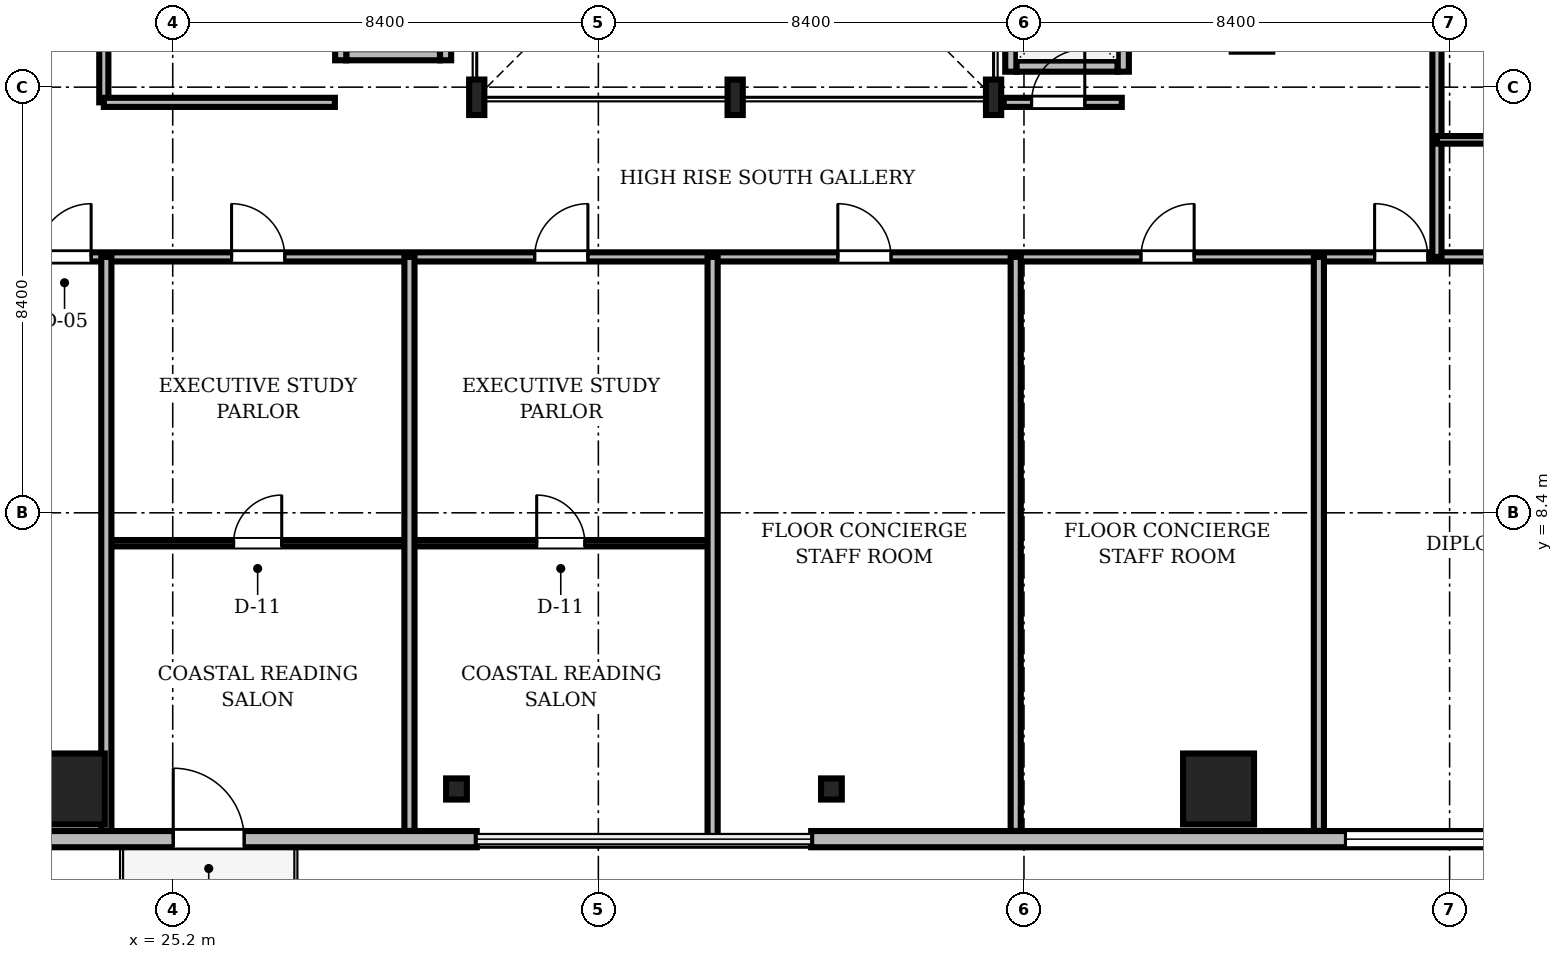
"""IFC4 building model, lengths in metres.
Left out: names, types, materials, properties, quantities, classifications, styles, units other than length and angle.
Written with IfcOpenShell. Run it as: python <this file> out.ifc"""

import sys

from ifc_helpers import new_model, si_unit, direction, frame, frame_2d, origin, origin_2d, place, context, subcontext, project, spatial, rectangle, i_section, extrude, source, transform, mapped, element, fill, save


model = new_model("IFC4")
c1 = context("Model", 3, precision=1e-05, world=origin(), true_north=direction((0.0, 1.0)))
c2 = subcontext(c1, "Body", "Model", "MODEL_VIEW")
j1 = project(units=[si_unit("LENGTHUNIT", "METRE"), si_unit("PLANEANGLEUNIT", "RADIAN")], contexts=[c1])
p1 = place(None, origin())
s1 = spatial("IfcSite", under=j1, at=p1, CompositionType="ELEMENT")
p2 = place(p1, origin())
s2 = spatial("IfcBuilding", under=s1, at=p2, CompositionType="ELEMENT")
p3 = place(p2, frame((0.0, 0.0, 203.55)))
s3 = spatial("IfcBuildingStorey", under=s2, at=p3, CompositionType="ELEMENT", Elevation=203.55)
m1 = source(origin(), c2, "Body", "SweptSolid", [
    extrude(i_section(OverallWidth=0.3, OverallDepth=0.7, WebThickness=0.017, FlangeThickness=0.032, FilletRadius=0.027, at=origin_2d()), origin(), (0.0, 0.0, 1.0), 3.53),
])
for number, where, z_axis, x_axis in (
    (1, (31.2, 16.6, 0.0), (0.0, 0.0, 1.0), (1.0, 0.0, 0.0)),
    (2, (36.3, 16.6, 0.0), (0.0, 0.0, 1.0), (1.0, 0.0, 0.0)),
    (3, (41.4, 16.6, 0.0), (0.0, 0.0, 1.0), (1.0, 0.0, 0.0)),
):
    element("IfcColumn", number, at=place(p3, frame(where, z_axis=z_axis, x_axis=x_axis)), inside=s3, PredefinedType="COLUMN", context=c2, shape_type="MappedRepresentation", body=[
        mapped(m1, transform((0.0, 0.0, 0.0), scale=1.0)),
    ])
m2 = source(origin(), c2, "Body", "SweptSolid", [
    extrude(rectangle(XDim=1.4, YDim=1.4, at=origin_2d()), origin(), (0.0, 0.0, 1.0), 3.53),
])
for number, where, z_axis, x_axis in (
    (4, (23.16, 2.95, 0.0), (0.0, 0.0, 1.0), (1.0, 0.0, 0.0)),
    (5, (45.84, 2.95, 0.0), (0.0, 0.0, 1.0), (1.0, 0.0, 0.0)),
):
    element("IfcColumn", number, at=place(p3, frame(where, z_axis=z_axis, x_axis=x_axis)), inside=s3, PredefinedType="COLUMN", context=c2, shape_type="MappedRepresentation", body=[
        mapped(m2, transform((0.0, 0.0, 0.0), scale=1.0)),
    ])
m3 = source(origin(), c2, "Body", "SweptSolid", [
    extrude(i_section(OverallWidth=0.409, OverallDepth=0.417, WebThickness=0.021, FlangeThickness=0.033, FilletRadius=0.015, at=origin_2d()), origin(), (0.0, 0.0, 1.0), 3.53),
])
for number, where, z_axis, x_axis in (
    (6, (30.8, 2.95, 0.0), (0.0, 0.0, 1.0), (1.0, 0.0, 0.0)),
    (7, (38.2, 2.95, 0.0), (0.0, 0.0, 1.0), (1.0, 0.0, 0.0)),
):
    element("IfcColumn", number, at=place(p3, frame(where, z_axis=z_axis, x_axis=x_axis)), inside=s3, PredefinedType="COLUMN", context=c2, shape_type="MappedRepresentation", body=[
        mapped(m3, transform((0.0, 0.0, 0.0), scale=1.0)),
    ])
m4 = source(origin(), c2, "Body", "SweptSolid", [
    extrude(rectangle(XDim=15.6, YDim=0.32, at=frame_2d((7.8, 0.0))), origin(), (0.0, 0.0, 1.0), 3.53),
])
p4 = place(p3, frame((15.6, 1.96, 0.0), z_axis=(0.0, 0.0, 1.0), x_axis=(1.0, 0.0, 0.0)))
e8 = element("IfcWall", 8, at=p4, inside=s3, PredefinedType="SOLIDWALL", context=c2, shape_type="MappedRepresentation", body=[
    mapped(m4, transform((0.0, 0.0, 0.0), scale=1.0)),
])
m5 = source(origin(), c2, "Body", "SweptSolid", [
    extrude(rectangle(XDim=1.4, YDim=2.3, at=frame_2d((0.7, 1.15))), frame((0.0, 0.17, 0.0), z_axis=(0.0, -1.0, 0.0), x_axis=(1.0, 0.0, 0.0)), (0.0, 0.0, 1.0), 0.34),
])
p5 = place(p4, frame((9.61, 0.0, 0.0)))
e9 = element("IfcOpeningElement", 9, at=p5, cuts=e8, PredefinedType="OPENING", context=c2, shape_type="MappedRepresentation", body=[
    mapped(m5, transform((0.0, 0.0, 0.0), scale=1.0)),
])
m6 = source(origin(), c2, "Body", "SweptSolid", [
    extrude(rectangle(XDim=2.8, YDim=2.4, at=frame_2d((1.4, 1.2))), frame((0.0, 0.17, 0.0), z_axis=(0.0, -1.0, 0.0), x_axis=(1.0, 0.0, 0.0)), (0.0, 0.0, 1.0), 0.34),
])
p6 = place(p4, frame((2.705, 0.0, 0.72)))
e10 = element("IfcOpeningElement", 10, at=p6, cuts=e8, PredefinedType="OPENING", context=c2, shape_type="MappedRepresentation", body=[
    mapped(m6, transform((0.0, 0.0, 0.0), scale=1.0)),
])
p7 = place(p3, frame((37.8, 1.96, 0.0), z_axis=(0.0, 0.0, 1.0), x_axis=(1.0, 0.0, 0.0)))
e11 = element("IfcWall", 11, at=p7, inside=s3, PredefinedType="SOLIDWALL", context=c2, shape_type="MappedRepresentation", body=[
    mapped(m4, transform((0.0, 0.0, 0.0), scale=1.0)),
])
p8 = place(p7, frame((10.545, 0.0, 0.72)))
e12 = element("IfcOpeningElement", 12, at=p8, cuts=e11, PredefinedType="OPENING", context=c2, shape_type="MappedRepresentation", body=[
    mapped(m6, transform((0.0, 0.0, 0.0), scale=1.0)),
])
m7 = source(origin(), c2, "Body", "SweptSolid", [
    extrude(rectangle(XDim=2.0, YDim=0.22, at=frame_2d((1.0, 0.0))), origin(), (0.0, 0.0, 1.0), 3.53),
])
p9 = place(p3, frame((41.85, 17.215, 0.0), z_axis=(0.0, 0.0, 1.0), x_axis=(1.0, 0.0, 0.0)))
e13 = element("IfcWall", 13, at=p9, inside=s3, PredefinedType="SOLIDWALL", context=c2, shape_type="MappedRepresentation", body=[
    mapped(m7, transform((0.0, 0.0, 0.0), scale=1.0)),
])
m8 = source(origin(), c2, "Body", "SweptSolid", [
    extrude(rectangle(XDim=2.19, YDim=0.22, at=frame_2d((1.095, 0.0))), origin(), (0.0, 0.0, 1.0), 3.53),
])
p10 = place(p3, frame((41.74, 17.105, 0.0), z_axis=(0.0, 0.0, 1.0), x_axis=(0.0, 1.0, 0.0)))
e14 = element("IfcWall", 14, at=p10, inside=s3, PredefinedType="SOLIDWALL", context=c2, shape_type="MappedRepresentation", body=[
    mapped(m8, transform((0.0, 0.0, 0.0), scale=1.0)),
])
p11 = place(p3, frame((43.96, 17.105, 0.0), z_axis=(0.0, 0.0, 1.0), x_axis=(0.0, 1.0, 0.0)))
e15 = element("IfcWall", 15, at=p11, inside=s3, PredefinedType="SOLIDWALL", context=c2, shape_type="MappedRepresentation", body=[
    mapped(m8, transform((0.0, 0.0, 0.0), scale=1.0)),
])
m9 = source(origin(), c2, "Body", "SweptSolid", [
    extrude(rectangle(XDim=1.1, YDim=2.2, at=frame_2d((0.55, 1.1))), frame((0.0, 0.12, 0.0), z_axis=(0.0, -1.0, 0.0), x_axis=(1.0, 0.0, 0.0)), (0.0, 0.0, 1.0), 0.24),
])
p12 = place(p11, frame((0.545, 0.0, 0.0)))
e16 = element("IfcOpeningElement", 16, at=p12, cuts=e15, PredefinedType="OPENING", context=c2, shape_type="MappedRepresentation", body=[
    mapped(m9, transform((0.0, 0.0, 0.0), scale=1.0)),
])
m10 = source(origin(), c2, "Body", "SweptSolid", [
    extrude(rectangle(XDim=1.85, YDim=0.22, at=frame_2d((0.925, 0.0))), origin(), (0.0, 0.0, 1.0), 2.972),
])
p13 = place(p3, frame((28.625, 17.44, 0.0), z_axis=(0.0, 0.0, 1.0), x_axis=(1.0, 0.0, 0.0)))
e17 = element("IfcWall", 17, at=p13, inside=s3, PredefinedType="SOLIDWALL", context=c2, shape_type="MappedRepresentation", body=[
    mapped(m10, transform((0.0, 0.0, 0.0), scale=1.0)),
])
m11 = source(origin(), c2, "Body", "SweptSolid", [
    extrude(rectangle(XDim=2.54, YDim=0.22, at=frame_2d((1.27, 0.0))), origin(), (0.0, 0.0, 1.0), 2.972),
])
p14 = place(p3, frame((28.515, 17.33, 0.0), z_axis=(0.0, 0.0, 1.0), x_axis=(0.0, 1.0, 0.0)))
e18 = element("IfcWall", 18, at=p14, inside=s3, PredefinedType="SOLIDWALL", context=c2, shape_type="MappedRepresentation", body=[
    mapped(m11, transform((0.0, 0.0, 0.0), scale=1.0)),
])
m12 = source(origin(), c2, "Body", "SweptSolid", [
    extrude(rectangle(XDim=2.54, YDim=0.22, at=frame_2d((1.27, 0.0))), origin(), (0.0, 0.0, 1.0), 3.53),
])
p15 = place(p3, frame((30.585, 17.33, 0.0), z_axis=(0.0, 0.0, 1.0), x_axis=(0.0, 1.0, 0.0)))
e19 = element("IfcWall", 19, at=p15, inside=s3, PredefinedType="SOLIDWALL", context=c2, shape_type="MappedRepresentation", body=[
    mapped(m12, transform((0.0, 0.0, 0.0), scale=1.0)),
])
m13 = source(origin(), c2, "Body", "SweptSolid", [
    extrude(rectangle(XDim=46.156, YDim=0.18, at=frame_2d((23.078, 0.0))), origin(), (0.0, 0.0, 1.0), 2.772),
])
p16 = place(p3, frame((11.422, 13.45, 0.0), z_axis=(0.0, 0.0, 1.0), x_axis=(1.0, 0.0, 0.0)))
e20 = element("IfcWall", 20, at=p16, inside=s3, PredefinedType="PARTITIONING", context=c2, shape_type="MappedRepresentation", body=[
    mapped(m13, transform((0.0, 0.0, 0.0), scale=1.0)),
])
m14 = source(origin(), c2, "Body", "SweptSolid", [
    extrude(rectangle(XDim=1.05, YDim=2.2, at=frame_2d((0.525, 1.1))), frame((0.0, 0.1, 0.0), z_axis=(0.0, -1.0, 0.0), x_axis=(1.0, 0.0, 0.0)), (0.0, 0.0, 1.0), 0.2),
])
p17 = place(p16, frame((11.118, 0.0, 0.0)))
e21 = element("IfcOpeningElement", 21, at=p17, cuts=e20, PredefinedType="OPENING", context=c2, shape_type="MappedRepresentation", body=[
    mapped(m14, transform((0.0, 0.0, 0.0), scale=1.0)),
])
p18 = place(p16, frame((14.939, 0.0, 0.0)))
e22 = element("IfcOpeningElement", 22, at=p18, cuts=e20, PredefinedType="OPENING", context=c2, shape_type="MappedRepresentation", body=[
    mapped(m14, transform((0.0, 0.0, 0.0), scale=1.0)),
])
p19 = place(p16, frame((20.922, 0.0, 0.0)))
e23 = element("IfcOpeningElement", 23, at=p19, cuts=e20, PredefinedType="OPENING", context=c2, shape_type="MappedRepresentation", body=[
    mapped(m14, transform((0.0, 0.0, 0.0), scale=1.0)),
])
p20 = place(p16, frame((26.904, 0.0, 0.0)))
e24 = element("IfcOpeningElement", 24, at=p20, cuts=e20, PredefinedType="OPENING", context=c2, shape_type="MappedRepresentation", body=[
    mapped(m14, transform((0.0, 0.0, 0.0), scale=1.0)),
])
p21 = place(p16, frame((32.887, 0.0, 0.0)))
e25 = element("IfcOpeningElement", 25, at=p21, cuts=e20, PredefinedType="OPENING", context=c2, shape_type="MappedRepresentation", body=[
    mapped(m14, transform((0.0, 0.0, 0.0), scale=1.0)),
])
p22 = place(p16, frame((37.498, 0.0, 0.0)))
e26 = element("IfcOpeningElement", 26, at=p22, cuts=e20, PredefinedType="OPENING", context=c2, shape_type="MappedRepresentation", body=[
    mapped(m14, transform((0.0, 0.0, 0.0), scale=1.0)),
])
m15 = source(origin(), c2, "Body", "SweptSolid", [
    extrude(rectangle(XDim=27.65, YDim=0.18, at=frame_2d((13.825, 0.0))), origin(), (0.0, 0.0, 1.0), 2.972),
])
p23 = place(p3, frame((50.15, 13.45, 0.0), z_axis=(0.0, 0.0, 1.0), x_axis=(0.0, 1.0, 0.0)))
e27 = element("IfcWall", 27, at=p23, inside=s3, PredefinedType="PARTITIONING", context=c2, shape_type="MappedRepresentation", body=[
    mapped(m15, transform((0.0, 0.0, 0.0), scale=1.0)),
])
p24 = place(p23, frame((5.237, 0.0, 0.0)))
e28 = element("IfcOpeningElement", 28, at=p24, cuts=e27, PredefinedType="OPENING", context=c2, shape_type="MappedRepresentation", body=[
    mapped(m14, transform((0.0, 0.0, 0.0), scale=1.0)),
])
p25 = place(p23, frame((14.38, 0.0, 0.0)))
e29 = element("IfcOpeningElement", 29, at=p25, cuts=e27, PredefinedType="OPENING", context=c2, shape_type="MappedRepresentation", body=[
    mapped(m14, transform((0.0, 0.0, 0.0), scale=1.0)),
])
p26 = place(p23, frame((23.523, 0.0, 0.0)))
e30 = element("IfcOpeningElement", 30, at=p26, cuts=e27, PredefinedType="OPENING", context=c2, shape_type="MappedRepresentation", body=[
    mapped(m14, transform((0.0, 0.0, 0.0), scale=1.0)),
])
m16 = source(origin(), c2, "Body", "SweptSolid", [
    extrude(rectangle(XDim=5.983, YDim=0.125, at=frame_2d((2.991, 0.0))), origin(), (0.0, 0.0, 1.0), 2.972),
])
p27 = place(p3, frame((29.872, 7.8, 0.0), z_axis=(0.0, 0.0, 1.0), x_axis=(1.0, 0.0, 0.0)))
e31 = element("IfcWall", 31, at=p27, inside=s3, PredefinedType="PARTITIONING", context=c2, shape_type="MappedRepresentation", body=[
    mapped(m16, transform((0.0, 0.0, 0.0), scale=1.0)),
])
m17 = source(origin(), c2, "Body", "SweptSolid", [
    extrude(rectangle(XDim=0.95, YDim=2.15, at=frame_2d((0.475, 1.075))), frame((0.0, 0.073, 0.0), z_axis=(0.0, -1.0, 0.0), x_axis=(1.0, 0.0, 0.0)), (0.0, 0.0, 1.0), 0.145),
])
p28 = place(p27, frame((2.511, 0.0, 0.0)))
e32 = element("IfcOpeningElement", 32, at=p28, cuts=e31, PredefinedType="OPENING", context=c2, shape_type="MappedRepresentation", body=[
    mapped(m17, transform((0.0, 0.0, 0.0), scale=1.0)),
])
m18 = source(origin(), c2, "Body", "SweptSolid", [
    extrude(rectangle(XDim=5.982, YDim=0.125, at=frame_2d((2.991, 0.0))), origin(), (0.0, 0.0, 1.0), 2.972),
])
p29 = place(p3, frame((23.89, 7.8, 0.0), z_axis=(0.0, 0.0, 1.0), x_axis=(1.0, 0.0, 0.0)))
e33 = element("IfcWall", 33, at=p29, inside=s3, PredefinedType="PARTITIONING", context=c2, shape_type="MappedRepresentation", body=[
    mapped(m18, transform((0.0, 0.0, 0.0), scale=1.0)),
])
p30 = place(p29, frame((2.511, 0.0, 0.0)))
e34 = element("IfcOpeningElement", 34, at=p30, cuts=e33, PredefinedType="OPENING", context=c2, shape_type="MappedRepresentation", body=[
    mapped(m17, transform((0.0, 0.0, 0.0), scale=1.0)),
])
m19 = source(origin(), c2, "Body", "SweptSolid", [
    extrude(rectangle(XDim=5.4, YDim=0.18, at=frame_2d((2.7, 0.0))), origin(), (0.0, 0.0, 1.0), 2.972),
])
p31 = place(p3, frame((23.84, 16.5, 0.0), z_axis=(0.0, 0.0, 1.0), x_axis=(0.0, 1.0, 0.0)))
e35 = element("IfcWall", 35, at=p31, inside=s3, PredefinedType="PARTITIONING", context=c2, shape_type="MappedRepresentation", body=[
    mapped(m19, transform((0.0, 0.0, 0.0), scale=1.0)),
])
p32 = place(p31, frame((2.0, 0.0, 0.0)))
e36 = element("IfcOpeningElement", 36, at=p32, cuts=e35, PredefinedType="OPENING", context=c2, shape_type="MappedRepresentation", body=[
    mapped(m14, transform((0.0, 0.0, 0.0), scale=1.0)),
])
m20 = source(origin(), c2, "Body", "SweptSolid", [
    extrude(rectangle(XDim=2.33, YDim=0.18, at=frame_2d((1.165, 0.0))), origin(), (0.0, 0.0, 1.0), 2.972),
])
p33 = place(p3, frame((41.6, 16.5, 0.0), z_axis=(0.0, 0.0, 1.0), x_axis=(1.0, 0.0, 0.0)))
e37 = element("IfcWall", 37, at=p33, inside=s3, PredefinedType="PARTITIONING", context=c2, shape_type="MappedRepresentation", body=[
    mapped(m20, transform((0.0, 0.0, 0.0), scale=1.0)),
])
p34 = place(p33, frame((0.55, 0.0, 0.0)))
e38 = element("IfcOpeningElement", 38, at=p34, cuts=e37, PredefinedType="OPENING", context=c2, shape_type="MappedRepresentation", body=[
    mapped(m14, transform((0.0, 0.0, 0.0), scale=1.0)),
])
m21 = source(origin(), c2, "Body", "SweptSolid", [
    extrude(rectangle(XDim=11.328, YDim=0.2, at=frame_2d((5.664, 0.0))), origin(), (0.0, 0.0, 1.0), 2.772),
])
for number, where, z_axis, x_axis in (
    (39, (23.89, 2.122, 0.0), (0.0, 0.0, 1.0), (0.0, 1.0, 0.0)),
    (40, (29.872, 2.122, 0.0), (0.0, 0.0, 1.0), (0.0, 1.0, 0.0)),
):
    element("IfcWall", number, at=place(p3, frame(where, z_axis=z_axis, x_axis=x_axis)), inside=s3, PredefinedType="PARTITIONING", context=c2, shape_type="MappedRepresentation", body=[
        mapped(m21, transform((0.0, 0.0, 0.0), scale=1.0)),
    ])
m22 = source(origin(), c2, "Body", "SweptSolid", [
    extrude(rectangle(XDim=11.52, YDim=0.2, at=frame_2d((5.76, 0.0))), origin(), (0.0, 0.0, 1.0), 2.772),
])
p35 = place(p3, frame((35.855, 1.93, 0.0), z_axis=(0.0, 0.0, 1.0), x_axis=(0.0, 1.0, 0.0)))
e41 = element("IfcWall", 41, at=p35, inside=s3, PredefinedType="PARTITIONING", context=c2, shape_type="MappedRepresentation", body=[
    mapped(m22, transform((0.0, 0.0, 0.0), scale=1.0)),
])
for number, where, z_axis, x_axis in (
    (42, (41.837, 2.122, 0.0), (0.0, 0.0, 1.0), (0.0, 1.0, 0.0)),
    (43, (47.82, 2.122, 0.0), (0.0, 0.0, 1.0), (0.0, 1.0, 0.0)),
):
    element("IfcWall", number, at=place(p3, frame(where, z_axis=z_axis, x_axis=x_axis)), inside=s3, PredefinedType="PARTITIONING", context=c2, shape_type="MappedRepresentation", body=[
        mapped(m21, transform((0.0, 0.0, 0.0), scale=1.0)),
    ])
m23 = source(origin(), c2, "Body", "SweptSolid", [
    extrude(rectangle(XDim=4.56, YDim=0.18, at=frame_2d((2.28, 0.0))), origin(), (0.0, 0.0, 1.0), 3.53),
])
p36 = place(p3, frame((23.84, 16.5, 0.0), z_axis=(0.0, 0.0, 1.0), x_axis=(1.0, 0.0, 0.0)))
e44 = element("IfcWall", 44, at=p36, inside=s3, PredefinedType="PARTITIONING", context=c2, shape_type="MappedRepresentation", body=[
    mapped(m23, transform((0.0, 0.0, 0.0), scale=1.0)),
])
m24 = source(origin(), c2, "Body", "SweptSolid", [
    extrude(rectangle(XDim=2.36, YDim=0.15, at=frame_2d((1.18, 0.0))), origin(), (0.0, 0.0, 1.0), 3.53),
])
p37 = place(p3, frame((50.15, 15.76, 0.0), z_axis=(0.0, 0.0, 1.0), x_axis=(1.0, 0.0, 0.0)))
e45 = element("IfcWall", 45, at=p37, inside=s3, PredefinedType="PARTITIONING", context=c2, shape_type="MappedRepresentation", body=[
    mapped(m24, transform((0.0, 0.0, 0.0), scale=1.0)),
])
m25 = source(origin(), c2, "Body", "SweptSolid", [
    extrude(rectangle(XDim=1.4, YDim=2.3, at=frame_2d((0.7, 1.15))), frame((0.0, 0.025, 0.0), z_axis=(0.0, -1.0, 0.0), x_axis=(1.0, 0.0, 0.0)), (0.0, 0.0, 1.0), 0.05),
])
p38 = place(p5, frame((1.4, 0.0, 0.0), z_axis=(0.0, 0.0, 1.0), x_axis=(-1.0, 0.0, 0.0)))
e46 = element("IfcDoor", 46, at=p38, inside=s3, OperationType="DOUBLE_DOOR_SLIDING", PredefinedType="DOOR", context=c2, shape_type="MappedRepresentation", body=[
    mapped(m25, transform((0.0, 0.0, 0.0), scale=1.0)),
])
fill(e9, e46)
m26 = source(origin(), c2, "Body", "SweptSolid", [
    extrude(rectangle(XDim=2.8, YDim=2.4, at=frame_2d((1.4, 1.2))), frame((0.0, 0.03, 0.0), z_axis=(0.0, -1.0, 0.0), x_axis=(1.0, 0.0, 0.0)), (0.0, 0.0, 1.0), 0.06),
])
p39 = place(p8, origin())
e47 = element("IfcWindow", 47, at=p39, inside=s3, PartitioningType="SINGLE_PANEL", PredefinedType="WINDOW", context=c2, shape_type="MappedRepresentation", body=[
    mapped(m26, transform((0.0, 0.0, 0.0), scale=1.0)),
])
fill(e12, e47)
m27 = source(origin(), c2, "Body", "SweptSolid", [
    extrude(rectangle(XDim=1.05, YDim=2.2, at=frame_2d((0.525, 1.1))), frame((0.0, 0.025, 0.0), z_axis=(0.0, -1.0, 0.0), x_axis=(1.0, 0.0, 0.0)), (0.0, 0.0, 1.0), 0.05),
])
p40 = place(p17, origin())
e48 = element("IfcDoor", 48, at=p40, inside=s3, OperationType="SINGLE_SWING_RIGHT", PredefinedType="DOOR", context=c2, shape_type="MappedRepresentation", body=[
    mapped(m27, transform((0.0, 0.0, 0.0), scale=1.0)),
])
fill(e21, e48)
p41 = place(p18, origin())
e49 = element("IfcDoor", 49, at=p41, inside=s3, OperationType="SINGLE_SWING_LEFT", PredefinedType="DOOR", context=c2, shape_type="MappedRepresentation", body=[
    mapped(m27, transform((0.0, 0.0, 0.0), scale=1.0)),
])
fill(e22, e49)
p42 = place(p19, origin())
e50 = element("IfcDoor", 50, at=p42, inside=s3, OperationType="SINGLE_SWING_RIGHT", PredefinedType="DOOR", context=c2, shape_type="MappedRepresentation", body=[
    mapped(m27, transform((0.0, 0.0, 0.0), scale=1.0)),
])
fill(e23, e50)
p43 = place(p20, origin())
e51 = element("IfcDoor", 51, at=p43, inside=s3, OperationType="SINGLE_SWING_LEFT", PredefinedType="DOOR", context=c2, shape_type="MappedRepresentation", body=[
    mapped(m27, transform((0.0, 0.0, 0.0), scale=1.0)),
])
fill(e24, e51)
p44 = place(p21, origin())
e52 = element("IfcDoor", 52, at=p44, inside=s3, OperationType="SINGLE_SWING_RIGHT", PredefinedType="DOOR", context=c2, shape_type="MappedRepresentation", body=[
    mapped(m27, transform((0.0, 0.0, 0.0), scale=1.0)),
])
fill(e25, e52)
p45 = place(p22, origin())
e53 = element("IfcDoor", 53, at=p45, inside=s3, OperationType="SINGLE_SWING_LEFT", PredefinedType="DOOR", context=c2, shape_type="MappedRepresentation", body=[
    mapped(m27, transform((0.0, 0.0, 0.0), scale=1.0)),
])
fill(e26, e53)
m28 = source(origin(), c2, "Body", "SweptSolid", [
    extrude(rectangle(XDim=0.95, YDim=2.15, at=frame_2d((0.475, 1.075))), frame((0.0, 0.025, 0.0), z_axis=(0.0, -1.0, 0.0), x_axis=(1.0, 0.0, 0.0)), (0.0, 0.0, 1.0), 0.05),
])
p46 = place(p28, origin())
e54 = element("IfcDoor", 54, at=p46, inside=s3, OperationType="SINGLE_SWING_LEFT", PredefinedType="DOOR", context=c2, shape_type="MappedRepresentation", body=[
    mapped(m28, transform((0.0, 0.0, 0.0), scale=1.0)),
])
fill(e32, e54)
p47 = place(p30, origin())
e55 = element("IfcDoor", 55, at=p47, inside=s3, OperationType="SINGLE_SWING_RIGHT", PredefinedType="DOOR", context=c2, shape_type="MappedRepresentation", body=[
    mapped(m28, transform((0.0, 0.0, 0.0), scale=1.0)),
])
fill(e34, e55)
p48 = place(p34, origin())
e56 = element("IfcDoor", 56, at=p48, inside=s3, OperationType="SINGLE_SWING_RIGHT", PredefinedType="DOOR", context=c2, shape_type="MappedRepresentation", body=[
    mapped(m27, transform((0.0, 0.0, 0.0), scale=1.0)),
])
fill(e38, e56)
save(model, sys.argv[1])
